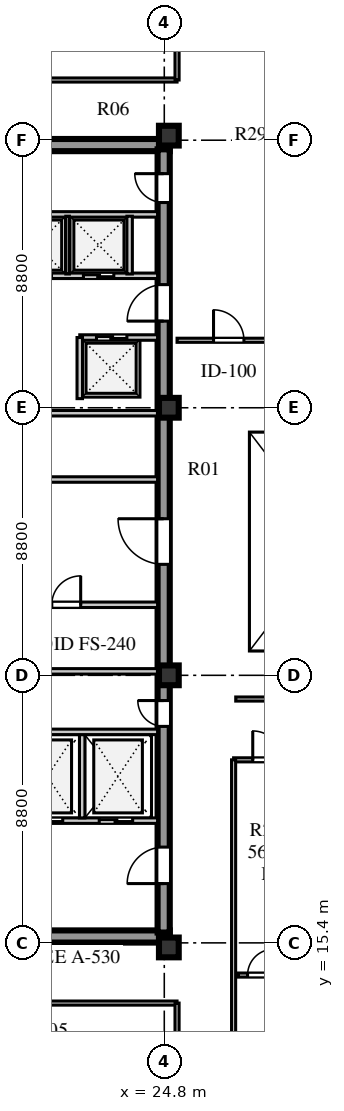
"""IFC4 building model, lengths in metres.
Left out: names, types, materials, properties, quantities, classifications, styles, units other than length and angle.
Written with IfcOpenShell. Run it as: python <this file> out.ifc"""

import sys

from ifc_helpers import new_model, si_unit, direction, frame, frame_2d, origin, origin_2d, place, context, subcontext, project, spatial, rectangle, extrude, element, fill, save


model = new_model("IFC4")
c1 = context("Model", 3, precision=1e-05, world=origin(), true_north=direction((0.0, 1.0)))
c2 = subcontext(c1, "Body", "Model", "MODEL_VIEW")
j1 = project(units=[si_unit("LENGTHUNIT", "METRE"), si_unit("PLANEANGLEUNIT", "RADIAN")], contexts=[c1])
p1 = place(None, origin())
s1 = spatial("IfcSite", under=j1, at=p1, CompositionType="ELEMENT")
p2 = place(p1, origin())
s2 = spatial("IfcBuilding", under=s1, at=p2, CompositionType="ELEMENT")
p3 = place(p2, frame((0.0, 0.0, 229.7)))
s3 = spatial("IfcBuildingStorey", under=s2, at=p3, CompositionType="ELEMENT", Elevation=229.7)
for number, where, z_axis, x_axis in (
    (1, (15.5, 15.61, 0.0), (0.0, 0.0, 1.0), (1.0, 0.0, 0.0)),
    (2, (15.5, 41.64, 0.0), (0.0, 0.0, 1.0), (1.0, 0.0, 0.0)),
):
    element("IfcWall", number, at=place(p3, frame(where, z_axis=z_axis, x_axis=x_axis)), inside=s3, PredefinedType="SHEAR", context=c2, shape_type="SweptSolid", body=[
        extrude(rectangle(XDim=9.48, YDim=0.4, at=frame_2d((4.74, 0.0))), origin(), (0.0, 0.0, 1.0), 3.66),
    ])
p4 = place(p3, frame((24.78, 15.74, 0.0), z_axis=(0.0, 0.0, 1.0), x_axis=(0.0, 1.0, 0.0)))
e3 = element("IfcWall", 3, at=p4, inside=s3, PredefinedType="SHEAR", context=c2, shape_type="SweptSolid", body=[
    extrude(rectangle(XDim=25.76, YDim=0.4, at=frame_2d((12.88, 0.0))), origin(), (0.0, 0.0, 1.0), 3.66),
])
p5 = place(p4, frame((1.61, 0.0, 0.0)))
e4 = element("IfcOpeningElement", 4, at=p5, cuts=e3, PredefinedType="OPENING", context=c2, shape_type="SweptSolid", body=[
    extrude(rectangle(XDim=1.2, YDim=2.1, at=frame_2d((0.6, 1.05))), frame((0.0, 0.21, 0.0), z_axis=(0.0, -1.0, 0.0), x_axis=(1.0, 0.0, 0.0)), (0.0, 0.0, 1.0), 0.42),
])
p6 = place(p4, frame((6.78, 0.0, 0.0)))
e5 = element("IfcOpeningElement", 5, at=p6, cuts=e3, PredefinedType="OPENING", context=c2, shape_type="SweptSolid", body=[
    extrude(rectangle(XDim=0.85, YDim=2.06, at=frame_2d((0.425, 1.03))), frame((0.0, 0.21, 0.0), z_axis=(0.0, -1.0, 0.0), x_axis=(1.0, 0.0, 0.0)), (0.0, 0.0, 1.0), 0.42),
])
p7 = place(p4, frame((12.11, 0.0, 0.0)))
e6 = element("IfcOpeningElement", 6, at=p7, cuts=e3, PredefinedType="OPENING", context=c2, shape_type="SweptSolid", body=[
    extrude(rectangle(XDim=1.5, YDim=2.12, at=frame_2d((0.75, 1.06))), frame((0.0, 0.21, 0.0), z_axis=(0.0, -1.0, 0.0), x_axis=(1.0, 0.0, 0.0)), (0.0, 0.0, 1.0), 0.42),
])
p8 = place(p4, frame((20.11, 0.0, 0.0)))
e7 = element("IfcOpeningElement", 7, at=p8, cuts=e3, PredefinedType="OPENING", context=c2, shape_type="SweptSolid", body=[
    extrude(rectangle(XDim=1.2, YDim=2.12, at=frame_2d((0.6, 1.06))), frame((0.0, 0.21, 0.0), z_axis=(0.0, -1.0, 0.0), x_axis=(1.0, 0.0, 0.0)), (0.0, 0.0, 1.0), 0.42),
])
p9 = place(p4, frame((24.01, 0.0, 0.0)))
e8 = element("IfcOpeningElement", 8, at=p9, cuts=e3, PredefinedType="OPENING", context=c2, shape_type="SweptSolid", body=[
    extrude(rectangle(XDim=0.95, YDim=2.1, at=frame_2d((0.475, 1.05))), frame((0.0, 0.21, 0.0), z_axis=(0.0, -1.0, 0.0), x_axis=(1.0, 0.0, 0.0)), (0.0, 0.0, 1.0), 0.42),
])
for number, where, z_axis, x_axis in (
    (9, (24.95, 15.25, 0.0), (0.0, 0.0, 1.0), (1.0, 0.0, 0.0)),
    (10, (24.95, 24.2, 0.0), (0.0, 0.0, 1.0), (1.0, 0.0, 0.0)),
    (11, (24.95, 33.0, 0.0), (0.0, 0.0, 1.0), (1.0, 0.0, 0.0)),
    (12, (24.95, 41.95, 0.0), (0.0, 0.0, 1.0), (1.0, 0.0, 0.0)),
):
    element("IfcColumn", number, at=place(p3, frame(where, z_axis=z_axis, x_axis=x_axis)), inside=s3, PredefinedType="COLUMN", context=c2, shape_type="SweptSolid", body=[
        extrude(rectangle(XDim=0.65, YDim=0.65, at=origin_2d()), origin(), (0.0, 0.0, 1.0), 3.66),
    ])
p10 = place(p3, frame((19.64, 19.42, 0.0), z_axis=(0.0, 0.0, 1.0), x_axis=(1.0, 0.0, 0.0)))
e13 = element("IfcWall", 13, at=p10, inside=s3, PredefinedType="SOLIDWALL", context=c2, shape_type="SweptSolid", body=[
    extrude(rectangle(XDim=4.94, YDim=0.18, at=frame_2d((2.47, 0.0))), origin(), (0.0, 0.0, 1.0), 3.66),
])
p11 = place(p10, frame((0.72, 0.0, 0.0)))
e14 = element("IfcOpeningElement", 14, at=p11, cuts=e13, PredefinedType="OPENING", context=c2, shape_type="SweptSolid", body=[
    extrude(rectangle(XDim=1.1, YDim=2.1, at=frame_2d((0.55, 1.05))), frame((0.0, 0.1, 0.0), z_axis=(0.0, -1.0, 0.0), x_axis=(1.0, 0.0, 0.0)), (0.0, 0.0, 1.0), 0.2),
])
p12 = place(p10, frame((3.02, 0.0, 0.0)))
e15 = element("IfcOpeningElement", 15, at=p12, cuts=e13, PredefinedType="OPENING", context=c2, shape_type="SweptSolid", body=[
    extrude(rectangle(XDim=1.1, YDim=2.1, at=frame_2d((0.55, 1.05))), frame((0.0, 0.1, 0.0), z_axis=(0.0, -1.0, 0.0), x_axis=(1.0, 0.0, 0.0)), (0.0, 0.0, 1.0), 0.2),
])
p13 = place(p3, frame((22.1, 19.51, 0.0), z_axis=(0.0, 0.0, 1.0), x_axis=(0.0, 1.0, 0.0)))
e16 = element("IfcWall", 16, at=p13, inside=s3, PredefinedType="SOLIDWALL", context=c2, shape_type="SweptSolid", body=[
    extrude(rectangle(XDim=2.74, YDim=0.18, at=frame_2d((1.37, 0.0))), origin(), (0.0, 0.0, 1.0), 3.66),
])
p14 = place(p3, frame((19.64, 22.34, 0.0), z_axis=(0.0, 0.0, 1.0), x_axis=(1.0, 0.0, 0.0)))
e17 = element("IfcWall", 17, at=p14, inside=s3, PredefinedType="SOLIDWALL", context=c2, shape_type="SweptSolid", body=[
    extrude(rectangle(XDim=4.94, YDim=0.18, at=frame_2d((2.47, 0.0))), origin(), (0.0, 0.0, 1.0), 3.66),
])
p15 = place(p3, frame((15.9, 26.52, 0.0), z_axis=(0.0, 0.0, 1.0), x_axis=(1.0, 0.0, 0.0)))
e18 = element("IfcWall", 18, at=p15, inside=s3, PredefinedType="SOLIDWALL", context=c2, shape_type="SweptSolid", body=[
    extrude(rectangle(XDim=8.68, YDim=0.18, at=frame_2d((4.34, 0.0))), origin(), (0.0, 0.0, 1.0), 3.66),
])
p16 = place(p15, frame((2.05, 0.0, 0.0)))
e19 = element("IfcOpeningElement", 19, at=p16, cuts=e18, PredefinedType="OPENING", context=c2, shape_type="SweptSolid", body=[
    extrude(rectangle(XDim=0.85, YDim=2.06, at=frame_2d((0.425, 1.03))), frame((0.0, 0.1, 0.0), z_axis=(0.0, -1.0, 0.0), x_axis=(1.0, 0.0, 0.0)), (0.0, 0.0, 1.0), 0.2),
])
p17 = place(p15, frame((5.2, 0.0, 0.0)))
e20 = element("IfcOpeningElement", 20, at=p17, cuts=e18, PredefinedType="OPENING", context=c2, shape_type="SweptSolid", body=[
    extrude(rectangle(XDim=0.95, YDim=2.1, at=frame_2d((0.475, 1.05))), frame((0.0, 0.1, 0.0), z_axis=(0.0, -1.0, 0.0), x_axis=(1.0, 0.0, 0.0)), (0.0, 0.0, 1.0), 0.2),
])
p18 = place(p3, frame((15.9, 24.33, 0.0), z_axis=(0.0, 0.0, 1.0), x_axis=(1.0, 0.0, 0.0)))
e21 = element("IfcWall", 21, at=p18, inside=s3, PredefinedType="SOLIDWALL", context=c2, shape_type="SweptSolid", body=[
    extrude(rectangle(XDim=8.68, YDim=0.18, at=frame_2d((4.34, 0.0))), origin(), (0.0, 0.0, 1.0), 3.06),
])
p19 = place(p3, frame((15.9, 30.64, 0.0), z_axis=(0.0, 0.0, 1.0), x_axis=(1.0, 0.0, 0.0)))
e22 = element("IfcWall", 22, at=p19, inside=s3, PredefinedType="SOLIDWALL", context=c2, shape_type="SweptSolid", body=[
    extrude(rectangle(XDim=8.68, YDim=0.18, at=frame_2d((4.34, 0.0))), origin(), (0.0, 0.0, 1.0), 3.66),
])
p20 = place(p19, frame((3.7, 0.0, 0.0)))
e23 = element("IfcOpeningElement", 23, at=p20, cuts=e22, PredefinedType="OPENING", context=c2, shape_type="SweptSolid", body=[
    extrude(rectangle(XDim=0.95, YDim=2.1, at=frame_2d((0.475, 1.05))), frame((0.0, 0.1, 0.0), z_axis=(0.0, -1.0, 0.0), x_axis=(1.0, 0.0, 0.0)), (0.0, 0.0, 1.0), 0.2),
])
p21 = place(p3, frame((15.9, 32.82, 0.0), z_axis=(0.0, 0.0, 1.0), x_axis=(1.0, 0.0, 0.0)))
e24 = element("IfcWall", 24, at=p21, inside=s3, PredefinedType="SOLIDWALL", context=c2, shape_type="SweptSolid", body=[
    extrude(rectangle(XDim=8.68, YDim=0.18, at=frame_2d((4.34, 0.0))), origin(), (0.0, 0.0, 1.0), 3.06),
])
p22 = place(p3, frame((22.02, 35.31, 0.0), z_axis=(0.0, 0.0, 1.0), x_axis=(1.0, 0.0, 0.0)))
e25 = element("IfcWall", 25, at=p22, inside=s3, PredefinedType="SOLIDWALL", context=c2, shape_type="SweptSolid", body=[
    extrude(rectangle(XDim=2.56, YDim=0.18, at=frame_2d((1.28, 0.0))), origin(), (0.0, 0.0, 1.0), 3.66),
])
p23 = place(p22, frame((0.55, 0.0, 0.0)))
e26 = element("IfcOpeningElement", 26, at=p23, cuts=e25, PredefinedType="OPENING", context=c2, shape_type="SweptSolid", body=[
    extrude(rectangle(XDim=1.0, YDim=2.1, at=frame_2d((0.5, 1.05))), frame((0.0, 0.1, 0.0), z_axis=(0.0, -1.0, 0.0), x_axis=(1.0, 0.0, 0.0)), (0.0, 0.0, 1.0), 0.2),
])
p24 = place(p3, frame((22.02, 33.3, 0.0), z_axis=(0.0, 0.0, 1.0), x_axis=(0.0, 1.0, 0.0)))
e27 = element("IfcWall", 27, at=p24, inside=s3, PredefinedType="SOLIDWALL", context=c2, shape_type="SweptSolid", body=[
    extrude(rectangle(XDim=2.01, YDim=0.18, at=frame_2d((1.005, 0.0))), origin(), (0.0, 0.0, 1.0), 3.66),
])
p25 = place(p3, frame((19.64, 37.34, 0.0), z_axis=(0.0, 0.0, 1.0), x_axis=(1.0, 0.0, 0.0)))
e28 = element("IfcWall", 28, at=p25, inside=s3, PredefinedType="SOLIDWALL", context=c2, shape_type="SweptSolid", body=[
    extrude(rectangle(XDim=4.94, YDim=0.18, at=frame_2d((2.47, 0.0))), origin(), (0.0, 0.0, 1.0), 3.66),
])
p26 = place(p25, frame((0.45, 0.0, 0.0)))
e29 = element("IfcOpeningElement", 29, at=p26, cuts=e28, PredefinedType="OPENING", context=c2, shape_type="SweptSolid", body=[
    extrude(rectangle(XDim=1.0, YDim=2.1, at=frame_2d((0.5, 1.05))), frame((0.0, 0.1, 0.0), z_axis=(0.0, -1.0, 0.0), x_axis=(1.0, 0.0, 0.0)), (0.0, 0.0, 1.0), 0.2),
])
p27 = place(p25, frame((2.5, 0.0, 0.0)))
e30 = element("IfcOpeningElement", 30, at=p27, cuts=e28, PredefinedType="OPENING", context=c2, shape_type="SweptSolid", body=[
    extrude(rectangle(XDim=1.0, YDim=2.1, at=frame_2d((0.5, 1.05))), frame((0.0, 0.1, 0.0), z_axis=(0.0, -1.0, 0.0), x_axis=(1.0, 0.0, 0.0)), (0.0, 0.0, 1.0), 0.2),
])
p28 = place(p3, frame((19.64, 39.36, 0.0), z_axis=(0.0, 0.0, 1.0), x_axis=(1.0, 0.0, 0.0)))
e31 = element("IfcWall", 31, at=p28, inside=s3, PredefinedType="SOLIDWALL", context=c2, shape_type="SweptSolid", body=[
    extrude(rectangle(XDim=4.94, YDim=0.18, at=frame_2d((2.47, 0.0))), origin(), (0.0, 0.0, 1.0), 3.66),
])
p29 = place(p3, frame((21.62, 37.4, 0.0), z_axis=(0.0, 0.0, 1.0), x_axis=(0.0, 1.0, 0.0)))
e32 = element("IfcWall", 32, at=p29, inside=s3, PredefinedType="PARTITIONING", context=c2, shape_type="SweptSolid", body=[
    extrude(rectangle(XDim=1.9, YDim=0.12, at=frame_2d((0.95, 0.0))), origin(), (0.0, 0.0, 1.0), 3.66),
])
p30 = place(p3, frame((23.66, 37.4, 0.0), z_axis=(0.0, 0.0, 1.0), x_axis=(0.0, 1.0, 0.0)))
e33 = element("IfcWall", 33, at=p30, inside=s3, PredefinedType="SOLIDWALL", context=c2, shape_type="SweptSolid", body=[
    extrude(rectangle(XDim=1.9, YDim=0.18, at=frame_2d((0.95, 0.0))), origin(), (0.0, 0.0, 1.0), 3.66),
])
p31 = place(p3, frame((27.08, 21.42, 0.0), z_axis=(0.0, 0.0, 1.0), x_axis=(1.0, 0.0, 0.0)))
e34 = element("IfcWall", 34, at=p31, inside=s3, PredefinedType="PARTITIONING", context=c2, shape_type="SweptSolid", body=[
    extrude(rectangle(XDim=12.07, YDim=0.135, at=frame_2d((6.035, 0.0))), origin(), (0.0, 0.0, 1.0), 3.31),
])
p32 = place(p31, frame((0.63, 0.0, 0.0)))
e35 = element("IfcOpeningElement", 35, at=p32, cuts=e34, PredefinedType="OPENING", context=c2, shape_type="SweptSolid", body=[
    extrude(rectangle(XDim=0.95, YDim=2.1, at=frame_2d((0.475, 1.05))), frame((0.0, 0.078, 0.0), z_axis=(0.0, -1.0, 0.0), x_axis=(1.0, 0.0, 0.0)), (0.0, 0.0, 1.0), 0.155),
])
p33 = place(p3, frame((27.08, 7.88, 0.0), z_axis=(0.0, 0.0, 1.0), x_axis=(0.0, 1.0, 0.0)))
e36 = element("IfcWall", 36, at=p33, inside=s3, PredefinedType="PARTITIONING", context=c2, shape_type="SweptSolid", body=[
    extrude(rectangle(XDim=13.54, YDim=0.135, at=frame_2d((6.77, 0.0))), origin(), (0.0, 0.0, 1.0), 3.66),
])
p34 = place(p3, frame((27.15, 23.42, 0.0), z_axis=(0.0, 0.0, 1.0), x_axis=(1.0, 0.0, 0.0)))
e37 = element("IfcWall", 37, at=p34, inside=s3, PredefinedType="PARTITIONING", context=c2, shape_type="SweptSolid", body=[
    extrude(rectangle(XDim=6.0, YDim=0.135, at=frame_2d((3.0, 0.0))), origin(), (0.0, 0.0, 1.0), 3.66),
])
p35 = place(p3, frame((25.22, 35.22, 0.0), z_axis=(0.0, 0.0, 1.0), x_axis=(1.0, 0.0, 0.0)))
e38 = element("IfcWall", 38, at=p35, inside=s3, PredefinedType="PARTITIONING", context=c2, shape_type="SweptSolid", body=[
    extrude(rectangle(XDim=9.5, YDim=0.135, at=frame_2d((4.75, 0.0))), origin(), (0.0, 0.0, 1.0), 3.66),
])
p36 = place(p35, frame((1.2, 0.0, 0.0)))
e39 = element("IfcOpeningElement", 39, at=p36, cuts=e38, PredefinedType="OPENING", context=c2, shape_type="SweptSolid", body=[
    extrude(rectangle(XDim=1.0, YDim=2.08, at=frame_2d((0.5, 1.04))), frame((0.0, 0.078, 0.0), z_axis=(0.0, -1.0, 0.0), x_axis=(1.0, 0.0, 0.0)), (0.0, 0.0, 1.0), 0.155),
])
p37 = place(p35, frame((6.2, 0.0, 0.0)))
e40 = element("IfcOpeningElement", 40, at=p37, cuts=e38, PredefinedType="OPENING", context=c2, shape_type="SweptSolid", body=[
    extrude(rectangle(XDim=0.9, YDim=2.08, at=frame_2d((0.45, 1.04))), frame((0.0, 0.078, 0.0), z_axis=(0.0, -1.0, 0.0), x_axis=(1.0, 0.0, 0.0)), (0.0, 0.0, 1.0), 0.155),
])
p38 = place(p3, frame((13.4, 13.42, 0.0), z_axis=(0.0, 0.0, 1.0), x_axis=(1.0, 0.0, 0.0)))
e41 = element("IfcWall", 41, at=p38, inside=s3, PredefinedType="PARTITIONING", context=c2, shape_type="SweptSolid", body=[
    extrude(rectangle(XDim=11.82, YDim=0.135, at=frame_2d((5.91, 0.0))), origin(), (0.0, 0.0, 1.0), 3.66),
])
p39 = place(p38, frame((3.2, 0.0, 0.0)))
e42 = element("IfcOpeningElement", 42, at=p39, cuts=e41, PredefinedType="OPENING", context=c2, shape_type="SweptSolid", body=[
    extrude(rectangle(XDim=0.95, YDim=2.08, at=frame_2d((0.475, 1.04))), frame((0.0, 0.078, 0.0), z_axis=(0.0, -1.0, 0.0), x_axis=(1.0, 0.0, 0.0)), (0.0, 0.0, 1.0), 0.155),
])
p40 = place(p3, frame((25.22, 7.88, 0.0), z_axis=(0.0, 0.0, 1.0), x_axis=(0.0, 1.0, 0.0)))
e43 = element("IfcWall", 43, at=p40, inside=s3, PredefinedType="PARTITIONING", context=c2, shape_type="SweptSolid", body=[
    extrude(rectangle(XDim=5.54, YDim=0.135, at=frame_2d((2.77, 0.0))), origin(), (0.0, 0.0, 1.0), 3.21),
])
p41 = place(p3, frame((13.4, 43.78, 0.0), z_axis=(0.0, 0.0, 1.0), x_axis=(1.0, 0.0, 0.0)))
e44 = element("IfcWall", 44, at=p41, inside=s3, PredefinedType="PARTITIONING", context=c2, shape_type="SweptSolid", body=[
    extrude(rectangle(XDim=11.82, YDim=0.135, at=frame_2d((5.91, 0.0))), origin(), (0.0, 0.0, 1.0), 3.66),
])
p42 = place(p41, frame((3.2, 0.0, 0.0)))
e45 = element("IfcOpeningElement", 45, at=p42, cuts=e44, PredefinedType="OPENING", context=c2, shape_type="SweptSolid", body=[
    extrude(rectangle(XDim=0.95, YDim=2.08, at=frame_2d((0.475, 1.04))), frame((0.0, 0.078, 0.0), z_axis=(0.0, -1.0, 0.0), x_axis=(1.0, 0.0, 0.0)), (0.0, 0.0, 1.0), 0.155),
])
p43 = place(p3, frame((25.22, 43.78, 0.0), z_axis=(0.0, 0.0, 1.0), x_axis=(0.0, 1.0, 0.0)))
e46 = element("IfcWall", 46, at=p43, inside=s3, PredefinedType="PARTITIONING", context=c2, shape_type="SweptSolid", body=[
    extrude(rectangle(XDim=5.54, YDim=0.135, at=frame_2d((2.77, 0.0))), origin(), (0.0, 0.0, 1.0), 3.21),
])
p44 = place(p3, frame((27.24, 14.341, 0.0), z_axis=(0.0, 0.0, 1.0), x_axis=(1.0, 0.0, 0.0)))
e47 = element("IfcWall", 47, at=p44, inside=s3, PredefinedType="PARTITIONING", context=c2, shape_type="SweptSolid", body=[
    extrude(rectangle(XDim=11.83, YDim=0.135, at=frame_2d((5.915, 0.0))), origin(), (0.0, 0.0, 1.0), 3.66),
])
p45 = place(p44, frame((0.3, 0.0, 0.0)))
e48 = element("IfcOpeningElement", 48, at=p45, cuts=e47, PredefinedType="OPENING", context=c2, shape_type="SweptSolid", body=[
    extrude(rectangle(XDim=0.85, YDim=2.08, at=frame_2d((0.425, 1.04))), frame((0.0, 0.078, 0.0), z_axis=(0.0, -1.0, 0.0), x_axis=(1.0, 0.0, 0.0)), (0.0, 0.0, 1.0), 0.155),
])
p46 = place(p44, frame((3.135, 0.0, 0.0)))
e49 = element("IfcOpeningElement", 49, at=p46, cuts=e47, PredefinedType="OPENING", context=c2, shape_type="SweptSolid", body=[
    extrude(rectangle(XDim=0.85, YDim=2.08, at=frame_2d((0.425, 1.04))), frame((0.0, 0.078, 0.0), z_axis=(0.0, -1.0, 0.0), x_axis=(1.0, 0.0, 0.0)), (0.0, 0.0, 1.0), 0.155),
])
p47 = place(p11, origin())
e50 = element("IfcDoor", 50, at=p47, inside=s3, OperationType="DOUBLE_DOOR_SLIDING", PredefinedType="DOOR", context=c2, shape_type="SweptSolid", body=[
    extrude(rectangle(XDim=1.1, YDim=2.1, at=frame_2d((0.55, 1.05))), frame((0.0, 0.025, 0.0), z_axis=(0.0, -1.0, 0.0), x_axis=(1.0, 0.0, 0.0)), (0.0, 0.0, 1.0), 0.05),
])
fill(e14, e50)
p48 = place(p12, origin())
e51 = element("IfcDoor", 51, at=p48, inside=s3, OperationType="DOUBLE_DOOR_SLIDING", PredefinedType="DOOR", context=c2, shape_type="SweptSolid", body=[
    extrude(rectangle(XDim=1.1, YDim=2.1, at=frame_2d((0.55, 1.05))), frame((0.0, 0.025, 0.0), z_axis=(0.0, -1.0, 0.0), x_axis=(1.0, 0.0, 0.0)), (0.0, 0.0, 1.0), 0.05),
])
fill(e15, e51)
p49 = place(p5, frame((1.2, 0.0, 0.0), z_axis=(0.0, 0.0, 1.0), x_axis=(-1.0, 0.0, 0.0)))
e52 = element("IfcDoor", 52, at=p49, inside=s3, OperationType="SINGLE_SWING_RIGHT", PredefinedType="DOOR", context=c2, shape_type="SweptSolid", body=[
    extrude(rectangle(XDim=1.2, YDim=2.1, at=frame_2d((0.6, 1.05))), frame((0.0, 0.025, 0.0), z_axis=(0.0, -1.0, 0.0), x_axis=(1.0, 0.0, 0.0)), (0.0, 0.0, 1.0), 0.05),
])
fill(e4, e52)
p50 = place(p6, frame((0.85, 0.0, 0.0), z_axis=(0.0, 0.0, 1.0), x_axis=(-1.0, 0.0, 0.0)))
e53 = element("IfcDoor", 53, at=p50, inside=s3, OperationType="SINGLE_SWING_LEFT", PredefinedType="DOOR", context=c2, shape_type="SweptSolid", body=[
    extrude(rectangle(XDim=0.85, YDim=2.06, at=frame_2d((0.425, 1.03))), frame((0.0, 0.025, 0.0), z_axis=(0.0, -1.0, 0.0), x_axis=(1.0, 0.0, 0.0)), (0.0, 0.0, 1.0), 0.05),
])
fill(e5, e53)
p51 = place(p17, origin())
e54 = element("IfcDoor", 54, at=p51, inside=s3, OperationType="SINGLE_SWING_RIGHT", PredefinedType="DOOR", context=c2, shape_type="SweptSolid", body=[
    extrude(rectangle(XDim=0.95, YDim=2.1, at=frame_2d((0.475, 1.05))), frame((0.0, 0.025, 0.0), z_axis=(0.0, -1.0, 0.0), x_axis=(1.0, 0.0, 0.0)), (0.0, 0.0, 1.0), 0.05),
])
fill(e20, e54)
p52 = place(p7, frame((1.5, 0.0, 0.0), z_axis=(0.0, 0.0, 1.0), x_axis=(-1.0, 0.0, 0.0)))
e55 = element("IfcDoor", 55, at=p52, inside=s3, OperationType="SINGLE_SWING_LEFT", PredefinedType="DOOR", context=c2, shape_type="SweptSolid", body=[
    extrude(rectangle(XDim=1.5, YDim=2.12, at=frame_2d((0.75, 1.06))), frame((0.0, 0.025, 0.0), z_axis=(0.0, -1.0, 0.0), x_axis=(1.0, 0.0, 0.0)), (0.0, 0.0, 1.0), 0.05),
])
fill(e6, e55)
p53 = place(p8, frame((1.2, 0.0, 0.0), z_axis=(0.0, 0.0, 1.0), x_axis=(-1.0, 0.0, 0.0)))
e56 = element("IfcDoor", 56, at=p53, inside=s3, OperationType="SINGLE_SWING_RIGHT", PredefinedType="DOOR", context=c2, shape_type="SweptSolid", body=[
    extrude(rectangle(XDim=1.2, YDim=2.12, at=frame_2d((0.6, 1.06))), frame((0.0, 0.025, 0.0), z_axis=(0.0, -1.0, 0.0), x_axis=(1.0, 0.0, 0.0)), (0.0, 0.0, 1.0), 0.05),
])
fill(e7, e56)
p54 = place(p27, frame((1.0, 0.0, 0.0), z_axis=(0.0, 0.0, 1.0), x_axis=(-1.0, 0.0, 0.0)))
e57 = element("IfcDoor", 57, at=p54, inside=s3, OperationType="DOUBLE_DOOR_SLIDING", PredefinedType="DOOR", context=c2, shape_type="SweptSolid", body=[
    extrude(rectangle(XDim=1.0, YDim=2.1, at=frame_2d((0.5, 1.05))), frame((0.0, 0.025, 0.0), z_axis=(0.0, -1.0, 0.0), x_axis=(1.0, 0.0, 0.0)), (0.0, 0.0, 1.0), 0.05),
])
fill(e30, e57)
p55 = place(p23, origin())
e58 = element("IfcDoor", 58, at=p55, inside=s3, OperationType="DOUBLE_DOOR_SLIDING", PredefinedType="DOOR", context=c2, shape_type="SweptSolid", body=[
    extrude(rectangle(XDim=1.0, YDim=2.1, at=frame_2d((0.5, 1.05))), frame((0.0, 0.025, 0.0), z_axis=(0.0, -1.0, 0.0), x_axis=(1.0, 0.0, 0.0)), (0.0, 0.0, 1.0), 0.05),
])
fill(e26, e58)
p56 = place(p9, frame((0.95, 0.0, 0.0), z_axis=(0.0, 0.0, 1.0), x_axis=(-1.0, 0.0, 0.0)))
e59 = element("IfcDoor", 59, at=p56, inside=s3, OperationType="SINGLE_SWING_LEFT", PredefinedType="DOOR", context=c2, shape_type="SweptSolid", body=[
    extrude(rectangle(XDim=0.95, YDim=2.1, at=frame_2d((0.475, 1.05))), frame((0.0, 0.025, 0.0), z_axis=(0.0, -1.0, 0.0), x_axis=(1.0, 0.0, 0.0)), (0.0, 0.0, 1.0), 0.05),
])
fill(e8, e59)
p57 = place(p45, frame((0.85, 0.0, 0.0), z_axis=(0.0, 0.0, 1.0), x_axis=(-1.0, 0.0, 0.0)))
e60 = element("IfcDoor", 60, at=p57, inside=s3, OperationType="SINGLE_SWING_LEFT", PredefinedType="DOOR", context=c2, shape_type="SweptSolid", body=[
    extrude(rectangle(XDim=0.85, YDim=2.08, at=frame_2d((0.425, 1.04))), frame((0.0, 0.025, 0.0), z_axis=(0.0, -1.0, 0.0), x_axis=(1.0, 0.0, 0.0)), (0.0, 0.0, 1.0), 0.05),
])
fill(e48, e60)
p58 = place(p32, frame((0.95, 0.0, 0.0), z_axis=(0.0, 0.0, 1.0), x_axis=(-1.0, 0.0, 0.0)))
e61 = element("IfcDoor", 61, at=p58, inside=s3, OperationType="SINGLE_SWING_RIGHT", PredefinedType="DOOR", context=c2, shape_type="SweptSolid", body=[
    extrude(rectangle(XDim=0.95, YDim=2.1, at=frame_2d((0.475, 1.05))), frame((0.0, 0.025, 0.0), z_axis=(0.0, -1.0, 0.0), x_axis=(1.0, 0.0, 0.0)), (0.0, 0.0, 1.0), 0.05),
])
fill(e35, e61)
p59 = place(p36, origin())
e62 = element("IfcDoor", 62, at=p59, inside=s3, OperationType="SINGLE_SWING_LEFT", PredefinedType="DOOR", context=c2, shape_type="SweptSolid", body=[
    extrude(rectangle(XDim=1.0, YDim=2.08, at=frame_2d((0.5, 1.04))), frame((0.0, 0.025, 0.0), z_axis=(0.0, -1.0, 0.0), x_axis=(1.0, 0.0, 0.0)), (0.0, 0.0, 1.0), 0.05),
])
fill(e39, e62)
save(model, sys.argv[1])
